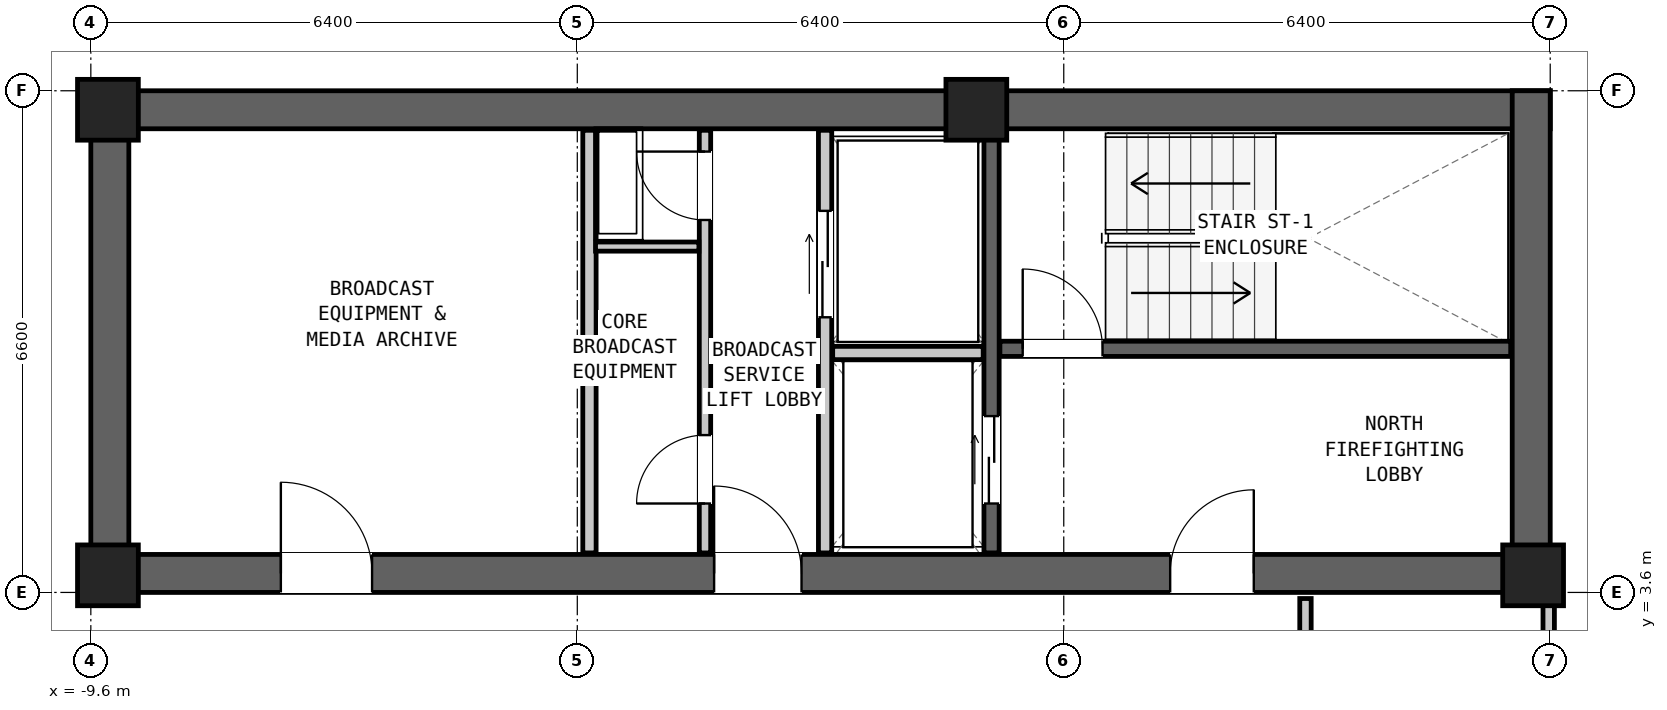
"""IFC4 building model, lengths in metres.
Left out: names, types, materials, properties, quantities, classifications, styles, units other than length and angle.
Written with IfcOpenShell. Run it as: python <this file> out.ifc"""

import sys

from ifc_helpers import new_model, si_unit, direction, frame, frame_2d, origin, origin_2d, place, context, subcontext, project, spatial, rectangle, extrude, element, fill, save


model = new_model("IFC4")
c1 = context("Model", 3, precision=1e-05, world=origin(), true_north=direction((0.0, 1.0)))
c2 = subcontext(c1, "Body", "Model", "MODEL_VIEW")
j1 = project(units=[si_unit("LENGTHUNIT", "METRE"), si_unit("PLANEANGLEUNIT", "RADIAN")], contexts=[c1])
p1 = place(None, origin())
s1 = spatial("IfcSite", under=j1, at=p1, CompositionType="ELEMENT")
p2 = place(p1, origin())
s2 = spatial("IfcBuilding", under=s1, at=p2, CompositionType="ELEMENT")
p3 = place(p2, frame((0.0, 0.0, 180.55)))
s3 = spatial("IfcBuildingStorey", under=s2, at=p3, CompositionType="ELEMENT", Elevation=180.55)
p4 = place(p3, frame((-9.6, 9.95, 0.0), z_axis=(0.0, 0.0, 1.0), x_axis=(1.0, 0.0, 0.0)))
e1 = element("IfcWall", 1, at=p4, inside=s3, PredefinedType="SHEAR", context=c2, shape_type="SweptSolid", body=[
    extrude(rectangle(XDim=19.2, YDim=0.5, at=frame_2d((9.6, 0.0))), origin(), (0.0, 0.0, 1.0), 3.05),
])
p5 = place(p3, frame((-9.6, 3.85, 0.0), z_axis=(0.0, 0.0, 1.0), x_axis=(1.0, 0.0, 0.0)))
e2 = element("IfcWall", 2, at=p5, inside=s3, PredefinedType="SHEAR", context=c2, shape_type="SweptSolid", body=[
    extrude(rectangle(XDim=19.2, YDim=0.5, at=frame_2d((9.6, 0.0))), origin(), (0.0, 0.0, 1.0), 3.05),
])
p6 = place(p5, frame((14.2, 0.0, 0.0)))
e3 = element("IfcOpeningElement", 3, at=p6, cuts=e2, PredefinedType="OPENING", context=c2, shape_type="SweptSolid", body=[
    extrude(rectangle(XDim=1.1, YDim=2.08, at=frame_2d((0.55, 1.04))), frame((0.0, 0.262, 0.0), z_axis=(0.0, -1.0, 0.0), x_axis=(1.0, 0.0, 0.0)), (0.0, 0.0, 1.0), 0.524),
])
p7 = place(p5, frame((8.2, 0.0, 0.0)))
e4 = element("IfcOpeningElement", 4, at=p7, cuts=e2, PredefinedType="OPENING", context=c2, shape_type="SweptSolid", body=[
    extrude(rectangle(XDim=1.15, YDim=2.1, at=frame_2d((0.575, 1.05))), frame((0.0, 0.262, 0.0), z_axis=(0.0, -1.0, 0.0), x_axis=(1.0, 0.0, 0.0)), (0.0, 0.0, 1.0), 0.524),
])
p8 = place(p5, frame((2.5, 0.0, 0.0)))
e5 = element("IfcOpeningElement", 5, at=p8, cuts=e2, PredefinedType="OPENING", context=c2, shape_type="SweptSolid", body=[
    extrude(rectangle(XDim=1.2, YDim=2.1, at=frame_2d((0.6, 1.05))), frame((0.0, 0.262, 0.0), z_axis=(0.0, -1.0, 0.0), x_axis=(1.0, 0.0, 0.0)), (0.0, 0.0, 1.0), 0.524),
])
for number, where, z_axis, x_axis in (
    (6, (-9.35, 3.6, 0.0), (0.0, 0.0, 1.0), (0.0, 1.0, 0.0)),
    (7, (9.35, 3.6, 0.0), (0.0, 0.0, 1.0), (0.0, 1.0, 0.0)),
):
    element("IfcWall", number, at=place(p3, frame(where, z_axis=z_axis, x_axis=x_axis)), inside=s3, PredefinedType="SHEAR", context=c2, shape_type="SweptSolid", body=[
        extrude(rectangle(XDim=6.6, YDim=0.5, at=frame_2d((3.3, 0.0))), origin(), (0.0, 0.0, 1.0), 3.05),
    ])
for number, where, z_axis, x_axis in (
    (8, (-9.375, 9.95, 0.0), (0.0, 0.0, 1.0), (1.0, 0.0, 0.0)),
    (9, (2.05, 9.95, 0.0), (0.0, 0.0, 1.0), (1.0, 0.0, 0.0)),
    (10, (-9.375, 3.825, 0.0), (0.0, 0.0, 1.0), (1.0, 0.0, 0.0)),
    (11, (9.375, 3.825, 0.0), (0.0, 0.0, 1.0), (1.0, 0.0, 0.0)),
):
    element("IfcColumn", number, at=place(p3, frame(where, z_axis=z_axis, x_axis=x_axis)), inside=s3, PredefinedType="COLUMN", context=c2, shape_type="SweptSolid", body=[
        extrude(rectangle(XDim=0.8, YDim=0.8, at=origin_2d()), origin(), (0.0, 0.0, 1.0), 3.05),
    ])
p9 = place(p3, frame((2.36, 6.805, 0.0), z_axis=(0.0, 0.0, 1.0), x_axis=(1.0, 0.0, 0.0)))
e12 = element("IfcWall", 12, at=p9, inside=s3, PredefinedType="SHEAR", context=c2, shape_type="SweptSolid", body=[
    extrude(rectangle(XDim=6.72, YDim=0.2, at=frame_2d((3.36, 0.0))), origin(), (0.0, 0.0, 1.0), 2.83),
])
p10 = place(p9, frame((0.3, 0.0, 0.0)))
e13 = element("IfcOpeningElement", 13, at=p10, cuts=e12, PredefinedType="OPENING", context=c2, shape_type="SweptSolid", body=[
    extrude(rectangle(XDim=1.05, YDim=2.08, at=frame_2d((0.525, 1.04))), frame((0.0, 0.112, 0.0), z_axis=(0.0, -1.0, 0.0), x_axis=(1.0, 0.0, 0.0)), (0.0, 0.0, 1.0), 0.224),
])
p11 = place(p3, frame((2.25, 4.12, 0.0), z_axis=(0.0, 0.0, 1.0), x_axis=(0.0, 1.0, 0.0)))
e14 = element("IfcWall", 14, at=p11, inside=s3, PredefinedType="SHEAR", context=c2, shape_type="SweptSolid", body=[
    extrude(rectangle(XDim=5.56, YDim=0.2, at=frame_2d((2.78, 0.0))), origin(), (0.0, 0.0, 1.0), 2.83),
])
p12 = place(p11, frame((0.65, 0.0, 0.0)))
e15 = element("IfcOpeningElement", 15, at=p12, cuts=e14, PredefinedType="OPENING", context=c2, shape_type="SweptSolid", body=[
    extrude(rectangle(XDim=1.15, YDim=2.08, at=frame_2d((0.575, 1.04))), frame((0.0, 0.112, 0.0), z_axis=(0.0, -1.0, 0.0), x_axis=(1.0, 0.0, 0.0)), (0.0, 0.0, 1.0), 0.224),
])
p13 = place(p3, frame((0.06, 4.12, 0.0), z_axis=(0.0, 0.0, 1.0), x_axis=(0.0, 1.0, 0.0)))
e16 = element("IfcWall", 16, at=p13, inside=s3, PredefinedType="PARTITIONING", context=c2, shape_type="SweptSolid", body=[
    extrude(rectangle(XDim=5.56, YDim=0.175, at=frame_2d((2.78, 0.0))), origin(), (0.0, 0.0, 1.0), 2.83),
])
p14 = place(p13, frame((3.1, 0.0, 0.0)))
e17 = element("IfcOpeningElement", 17, at=p14, cuts=e16, PredefinedType="OPENING", context=c2, shape_type="SweptSolid", body=[
    extrude(rectangle(XDim=1.4, YDim=2.12, at=frame_2d((0.7, 1.06))), frame((0.0, 0.1, 0.0), z_axis=(0.0, -1.0, 0.0), x_axis=(1.0, 0.0, 0.0)), (0.0, 0.0, 1.0), 0.199),
])
p15 = place(p3, frame((0.16, 6.75, 0.0), z_axis=(0.0, 0.0, 1.0), x_axis=(1.0, 0.0, 0.0)))
e18 = element("IfcWall", 18, at=p15, inside=s3, PredefinedType="PARTITIONING", context=c2, shape_type="SweptSolid", body=[
    extrude(rectangle(XDim=1.98, YDim=0.175, at=frame_2d((0.99, 0.0))), origin(), (0.0, 0.0, 1.0), 2.83),
])
p16 = place(p3, frame((-3.04, 4.12, 0.0), z_axis=(0.0, 0.0, 1.0), x_axis=(0.0, 1.0, 0.0)))
e19 = element("IfcWall", 19, at=p16, inside=s3, PredefinedType="PARTITIONING", context=c2, shape_type="SweptSolid", body=[
    extrude(rectangle(XDim=5.56, YDim=0.175, at=frame_2d((2.78, 0.0))), origin(), (0.0, 0.0, 1.0), 2.83),
])
p17 = place(p3, frame((-1.52, 4.12, 0.0), z_axis=(0.0, 0.0, 1.0), x_axis=(0.0, 1.0, 0.0)))
e20 = element("IfcWall", 20, at=p17, inside=s3, PredefinedType="PARTITIONING", context=c2, shape_type="SweptSolid", body=[
    extrude(rectangle(XDim=5.56, YDim=0.15, at=frame_2d((2.78, 0.0))), origin(), (0.0, 0.0, 1.0), 2.83),
])
p18 = place(p17, frame((4.38, 0.0, 0.0)))
e21 = element("IfcOpeningElement", 21, at=p18, cuts=e20, PredefinedType="OPENING", context=c2, shape_type="SweptSolid", body=[
    extrude(rectangle(XDim=0.9, YDim=2.05, at=frame_2d((0.45, 1.025))), frame((0.0, 0.087, 0.0), z_axis=(0.0, -1.0, 0.0), x_axis=(1.0, 0.0, 0.0)), (0.0, 0.0, 1.0), 0.174),
])
p19 = place(p17, frame((0.65, 0.0, 0.0)))
e22 = element("IfcOpeningElement", 22, at=p19, cuts=e20, PredefinedType="OPENING", context=c2, shape_type="SweptSolid", body=[
    extrude(rectangle(XDim=0.9, YDim=2.05, at=frame_2d((0.45, 1.025))), frame((0.0, 0.087, 0.0), z_axis=(0.0, -1.0, 0.0), x_axis=(1.0, 0.0, 0.0)), (0.0, 0.0, 1.0), 0.174),
])
p20 = place(p3, frame((-2.96, 8.15, 0.0), z_axis=(0.0, 0.0, 1.0), x_axis=(1.0, 0.0, 0.0)))
e23 = element("IfcWall", 23, at=p20, inside=s3, PredefinedType="PARTITIONING", context=c2, shape_type="SweptSolid", body=[
    extrude(rectangle(XDim=1.36, YDim=0.12, at=frame_2d((0.68, 0.0))), origin(), (0.0, 0.0, 1.0), 2.83),
])
p21 = place(p3, frame((6.38, -2.32, 0.0), z_axis=(0.0, 0.0, 1.0), x_axis=(0.0, 1.0, 0.0)))
e24 = element("IfcWall", 24, at=p21, inside=s3, PredefinedType="PARTITIONING", context=c2, shape_type="SweptSolid", body=[
    extrude(rectangle(XDim=5.84, YDim=0.15, at=frame_2d((2.92, 0.0))), origin(), (0.0, 0.0, 1.0), 2.198),
])
p22 = place(p3, frame((9.58, -2.32, 0.0), z_axis=(0.0, 0.0, 1.0), x_axis=(0.0, 1.0, 0.0)))
e25 = element("IfcWall", 25, at=p22, inside=s3, PredefinedType="PARTITIONING", context=c2, shape_type="SweptSolid", body=[
    extrude(rectangle(XDim=5.84, YDim=0.15, at=frame_2d((2.92, 0.0))), origin(), (0.0, 0.0, 1.0), 2.198),
])
p23 = place(p22, frame((2.445, 0.0, 0.0)))
e26 = element("IfcOpeningElement", 26, at=p23, cuts=e25, PredefinedType="OPENING", context=c2, shape_type="SweptSolid", body=[
    extrude(rectangle(XDim=0.95, YDim=2.1, at=frame_2d((0.475, 1.05))), frame((0.0, 0.087, 0.0), z_axis=(0.0, -1.0, 0.0), x_axis=(1.0, 0.0, 0.0)), (0.0, 0.0, 1.0), 0.174),
])
p24 = place(p10, origin())
e27 = element("IfcDoor", 27, at=p24, inside=s3, OperationType="SINGLE_SWING_LEFT", PredefinedType="DOOR", context=c2, shape_type="SweptSolid", body=[
    extrude(rectangle(XDim=1.05, YDim=2.08, at=frame_2d((0.525, 1.04))), frame((0.0, 0.025, 0.0), z_axis=(0.0, -1.0, 0.0), x_axis=(1.0, 0.0, 0.0)), (0.0, 0.0, 1.0), 0.05),
])
fill(e13, e27)
p25 = place(p6, origin())
e28 = element("IfcDoor", 28, at=p25, inside=s3, OperationType="SINGLE_SWING_RIGHT", PredefinedType="DOOR", context=c2, shape_type="SweptSolid", body=[
    extrude(rectangle(XDim=1.1, YDim=2.08, at=frame_2d((0.55, 1.04))), frame((0.0, 0.025, 0.0), z_axis=(0.0, -1.0, 0.0), x_axis=(1.0, 0.0, 0.0)), (0.0, 0.0, 1.0), 0.05),
])
fill(e3, e28)
p26 = place(p12, origin())
e29 = element("IfcDoor", 29, at=p26, inside=s3, OperationType="DOUBLE_DOOR_SLIDING", PredefinedType="DOOR", context=c2, shape_type="SweptSolid", body=[
    extrude(rectangle(XDim=1.15, YDim=2.08, at=frame_2d((0.575, 1.04))), frame((0.0, 0.025, 0.0), z_axis=(0.0, -1.0, 0.0), x_axis=(1.0, 0.0, 0.0)), (0.0, 0.0, 1.0), 0.05),
])
fill(e15, e29)
p27 = place(p14, origin())
e30 = element("IfcDoor", 30, at=p27, inside=s3, OperationType="DOUBLE_DOOR_SLIDING", PredefinedType="DOOR", context=c2, shape_type="SweptSolid", body=[
    extrude(rectangle(XDim=1.4, YDim=2.12, at=frame_2d((0.7, 1.06))), frame((0.0, 0.025, 0.0), z_axis=(0.0, -1.0, 0.0), x_axis=(1.0, 0.0, 0.0)), (0.0, 0.0, 1.0), 0.05),
])
fill(e17, e30)
p28 = place(p7, origin())
e31 = element("IfcDoor", 31, at=p28, inside=s3, OperationType="SINGLE_SWING_LEFT", PredefinedType="DOOR", context=c2, shape_type="SweptSolid", body=[
    extrude(rectangle(XDim=1.15, YDim=2.1, at=frame_2d((0.575, 1.05))), frame((0.0, 0.025, 0.0), z_axis=(0.0, -1.0, 0.0), x_axis=(1.0, 0.0, 0.0)), (0.0, 0.0, 1.0), 0.05),
])
fill(e4, e31)
p29 = place(p18, origin())
e32 = element("IfcDoor", 32, at=p29, inside=s3, OperationType="SINGLE_SWING_RIGHT", PredefinedType="DOOR", context=c2, shape_type="SweptSolid", body=[
    extrude(rectangle(XDim=0.9, YDim=2.05, at=frame_2d((0.45, 1.025))), frame((0.0, 0.025, 0.0), z_axis=(0.0, -1.0, 0.0), x_axis=(1.0, 0.0, 0.0)), (0.0, 0.0, 1.0), 0.05),
])
fill(e21, e32)
p30 = place(p19, origin())
e33 = element("IfcDoor", 33, at=p30, inside=s3, OperationType="SINGLE_SWING_LEFT", PredefinedType="DOOR", context=c2, shape_type="SweptSolid", body=[
    extrude(rectangle(XDim=0.9, YDim=2.05, at=frame_2d((0.45, 1.025))), frame((0.0, 0.025, 0.0), z_axis=(0.0, -1.0, 0.0), x_axis=(1.0, 0.0, 0.0)), (0.0, 0.0, 1.0), 0.05),
])
fill(e22, e33)
p31 = place(p8, origin())
e34 = element("IfcDoor", 34, at=p31, inside=s3, OperationType="SINGLE_SWING_LEFT", PredefinedType="DOOR", context=c2, shape_type="SweptSolid", body=[
    extrude(rectangle(XDim=1.2, YDim=2.1, at=frame_2d((0.6, 1.05))), frame((0.0, 0.025, 0.0), z_axis=(0.0, -1.0, 0.0), x_axis=(1.0, 0.0, 0.0)), (0.0, 0.0, 1.0), 0.05),
])
fill(e5, e34)
save(model, sys.argv[1])
